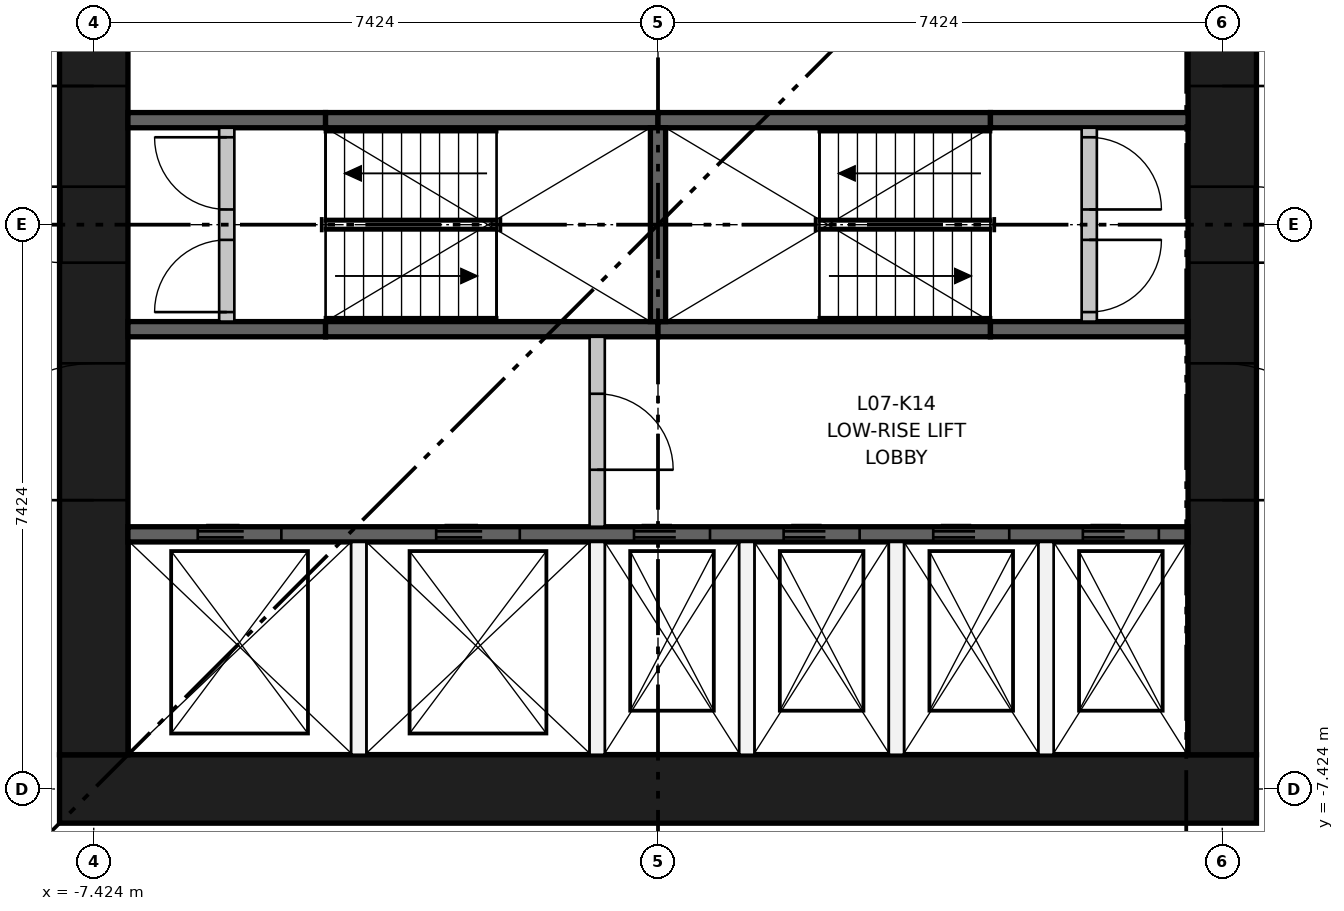
"""IFC4 building model, lengths in metres.
Left out: names, types, materials, properties, quantities, classifications, styles, units other than length and angle.
Written with IfcOpenShell. Run it as: python <this file> out.ifc"""

import sys

from ifc_helpers import new_model, si_unit, direction, frame, frame_2d, origin, place, context, subcontext, project, spatial, rectangle, extrude, element, fill, save


model = new_model("IFC4")
c1 = context("Model", 3, precision=1e-05, world=origin(), true_north=direction((0.0, 1.0)))
c2 = subcontext(c1, "Body", "Model", "MODEL_VIEW")
j1 = project(units=[si_unit("LENGTHUNIT", "METRE"), si_unit("PLANEANGLEUNIT", "RADIAN")], contexts=[c1])
p1 = place(None, origin())
s1 = spatial("IfcSite", under=j1, at=p1, CompositionType="ELEMENT")
p2 = place(p1, origin())
s2 = spatial("IfcBuilding", under=s1, at=p2, CompositionType="ELEMENT")
p3 = place(p2, frame((0.0, 0.0, 29.85)))
s3 = spatial("IfcBuildingStorey", under=s2, at=p3, CompositionType="ELEMENT", Elevation=29.85)
p4 = place(p3, frame((-7.874, -7.424, 0.0), z_axis=(0.0, 0.0, 1.0), x_axis=(1.0, 0.0, 0.0)))
e1 = element("IfcWall", 1, at=p4, inside=s3, PredefinedType="SHEAR", context=c2, shape_type="SweptSolid", body=[
    extrude(rectangle(XDim=15.748, YDim=0.9, at=frame_2d((7.874, 0.0))), origin(), (0.0, 0.0, 1.0), 3.65),
])
p5 = place(p3, frame((-7.424, -6.974, 0.0), z_axis=(0.0, 0.0, 1.0), x_axis=(0.0, 1.0, 0.0)))
e2 = element("IfcWall", 2, at=p5, inside=s3, PredefinedType="SHEAR", context=c2, shape_type="SweptSolid", body=[
    extrude(rectangle(XDim=13.948, YDim=0.9, at=frame_2d((6.974, 0.0))), origin(), (0.0, 0.0, 1.0), 3.65),
])
p6 = place(p5, frame((6.474, 0.0, 0.0)))
e3 = element("IfcOpeningElement", 3, at=p6, cuts=e2, PredefinedType="OPENING", context=c2, shape_type="SweptSolid", body=[
    extrude(rectangle(XDim=1.0, YDim=2.1, at=frame_2d((0.5, 1.05))), frame((0.0, 0.46, 0.0), z_axis=(0.0, -1.0, 0.0), x_axis=(1.0, 0.0, 0.0)), (0.0, 0.0, 1.0), 0.92),
])
p7 = place(p5, frame((3.35, 0.0, 0.0)))
e4 = element("IfcOpeningElement", 4, at=p7, cuts=e2, PredefinedType="OPENING", context=c2, shape_type="SweptSolid", body=[
    extrude(rectangle(XDim=1.8, YDim=2.1, at=frame_2d((0.9, 1.05))), frame((0.0, 0.46, 0.0), z_axis=(0.0, -1.0, 0.0), x_axis=(1.0, 0.0, 0.0)), (0.0, 0.0, 1.0), 0.92),
])
p8 = place(p5, frame((8.799, 0.0, 0.0)))
e5 = element("IfcOpeningElement", 5, at=p8, cuts=e2, PredefinedType="OPENING", context=c2, shape_type="SweptSolid", body=[
    extrude(rectangle(XDim=1.8, YDim=2.1, at=frame_2d((0.9, 1.05))), frame((0.0, 0.46, 0.0), z_axis=(0.0, -1.0, 0.0), x_axis=(1.0, 0.0, 0.0)), (0.0, 0.0, 1.0), 0.92),
])
p9 = place(p5, frame((11.974, 0.0, 0.0)))
e6 = element("IfcOpeningElement", 6, at=p9, cuts=e2, PredefinedType="OPENING", context=c2, shape_type="SweptSolid", body=[
    extrude(rectangle(XDim=1.0, YDim=2.1, at=frame_2d((0.5, 1.05))), frame((0.0, 0.46, 0.0), z_axis=(0.0, -1.0, 0.0), x_axis=(1.0, 0.0, 0.0)), (0.0, 0.0, 1.0), 0.92),
])
p10 = place(p3, frame((7.424, -6.974, 0.0), z_axis=(0.0, 0.0, 1.0), x_axis=(0.0, 1.0, 0.0)))
e7 = element("IfcWall", 7, at=p10, inside=s3, PredefinedType="SHEAR", context=c2, shape_type="SweptSolid", body=[
    extrude(rectangle(XDim=13.948, YDim=0.9, at=frame_2d((6.974, 0.0))), origin(), (0.0, 0.0, 1.0), 3.65),
])
p11 = place(p10, frame((6.474, 0.0, 0.0)))
e8 = element("IfcOpeningElement", 8, at=p11, cuts=e7, PredefinedType="OPENING", context=c2, shape_type="SweptSolid", body=[
    extrude(rectangle(XDim=1.0, YDim=2.1, at=frame_2d((0.5, 1.05))), frame((0.0, 0.46, 0.0), z_axis=(0.0, -1.0, 0.0), x_axis=(1.0, 0.0, 0.0)), (0.0, 0.0, 1.0), 0.92),
])
p12 = place(p10, frame((3.35, 0.0, 0.0)))
e9 = element("IfcOpeningElement", 9, at=p12, cuts=e7, PredefinedType="OPENING", context=c2, shape_type="SweptSolid", body=[
    extrude(rectangle(XDim=1.8, YDim=2.1, at=frame_2d((0.9, 1.05))), frame((0.0, 0.46, 0.0), z_axis=(0.0, -1.0, 0.0), x_axis=(1.0, 0.0, 0.0)), (0.0, 0.0, 1.0), 0.92),
])
p13 = place(p10, frame((8.799, 0.0, 0.0)))
e10 = element("IfcOpeningElement", 10, at=p13, cuts=e7, PredefinedType="OPENING", context=c2, shape_type="SweptSolid", body=[
    extrude(rectangle(XDim=1.8, YDim=2.1, at=frame_2d((0.9, 1.05))), frame((0.0, 0.46, 0.0), z_axis=(0.0, -1.0, 0.0), x_axis=(1.0, 0.0, 0.0)), (0.0, 0.0, 1.0), 0.92),
])
p14 = place(p3, frame((-6.974, -4.074, 0.0), z_axis=(0.0, 0.0, 1.0), x_axis=(1.0, 0.0, 0.0)))
e11 = element("IfcWall", 11, at=p14, inside=s3, PredefinedType="SHEAR", context=c2, shape_type="SweptSolid", body=[
    extrude(rectangle(XDim=13.948, YDim=0.2, at=frame_2d((6.974, 0.0))), origin(), (0.0, 0.0, 1.0), 3.3),
])
p15 = place(p14, frame((0.918, 0.0, 0.0)))
e12 = element("IfcOpeningElement", 12, at=p15, cuts=e11, PredefinedType="OPENING", context=c2, shape_type="SweptSolid", body=[
    extrude(rectangle(XDim=1.1, YDim=2.1, at=frame_2d((0.55, 1.05))), frame((0.0, 0.11, 0.0), z_axis=(0.0, -1.0, 0.0), x_axis=(1.0, 0.0, 0.0)), (0.0, 0.0, 1.0), 0.22),
])
p16 = place(p14, frame((4.055, 0.0, 0.0)))
e13 = element("IfcOpeningElement", 13, at=p16, cuts=e11, PredefinedType="OPENING", context=c2, shape_type="SweptSolid", body=[
    extrude(rectangle(XDim=1.1, YDim=2.1, at=frame_2d((0.55, 1.05))), frame((0.0, 0.11, 0.0), z_axis=(0.0, -1.0, 0.0), x_axis=(1.0, 0.0, 0.0)), (0.0, 0.0, 1.0), 0.22),
])
p17 = place(p14, frame((6.658, 0.0, 0.0)))
e14 = element("IfcOpeningElement", 14, at=p17, cuts=e11, PredefinedType="OPENING", context=c2, shape_type="SweptSolid", body=[
    extrude(rectangle(XDim=1.0, YDim=2.1, at=frame_2d((0.5, 1.05))), frame((0.0, 0.11, 0.0), z_axis=(0.0, -1.0, 0.0), x_axis=(1.0, 0.0, 0.0)), (0.0, 0.0, 1.0), 0.22),
])
p18 = place(p14, frame((8.627, 0.0, 0.0)))
e15 = element("IfcOpeningElement", 15, at=p18, cuts=e11, PredefinedType="OPENING", context=c2, shape_type="SweptSolid", body=[
    extrude(rectangle(XDim=1.0, YDim=2.1, at=frame_2d((0.5, 1.05))), frame((0.0, 0.11, 0.0), z_axis=(0.0, -1.0, 0.0), x_axis=(1.0, 0.0, 0.0)), (0.0, 0.0, 1.0), 0.22),
])
p19 = place(p14, frame((10.595, 0.0, 0.0)))
e16 = element("IfcOpeningElement", 16, at=p19, cuts=e11, PredefinedType="OPENING", context=c2, shape_type="SweptSolid", body=[
    extrude(rectangle(XDim=1.0, YDim=2.1, at=frame_2d((0.5, 1.05))), frame((0.0, 0.11, 0.0), z_axis=(0.0, -1.0, 0.0), x_axis=(1.0, 0.0, 0.0)), (0.0, 0.0, 1.0), 0.22),
])
p20 = place(p14, frame((12.564, 0.0, 0.0)))
e17 = element("IfcOpeningElement", 17, at=p20, cuts=e11, PredefinedType="OPENING", context=c2, shape_type="SweptSolid", body=[
    extrude(rectangle(XDim=1.0, YDim=2.1, at=frame_2d((0.5, 1.05))), frame((0.0, 0.11, 0.0), z_axis=(0.0, -1.0, 0.0), x_axis=(1.0, 0.0, 0.0)), (0.0, 0.0, 1.0), 0.22),
])
p21 = place(p3, frame((-6.974, -1.375, 0.0), z_axis=(0.0, 0.0, 1.0), x_axis=(1.0, 0.0, 0.0)))
e18 = element("IfcWall", 18, at=p21, inside=s3, PredefinedType="SHEAR", context=c2, shape_type="SweptSolid", body=[
    extrude(rectangle(XDim=2.6, YDim=0.2, at=frame_2d((1.3, 0.0))), origin(), (0.0, 0.0, 1.0), 3.3),
])
for number, where, z_axis, x_axis in (
    (19, (-4.374, -1.375, 0.0), (0.0, 0.0, 1.0), (1.0, 0.0, 0.0)),
    (20, (0.0, -1.375, 0.0), (0.0, 0.0, 1.0), (1.0, 0.0, 0.0)),
):
    element("IfcWall", number, at=place(p3, frame(where, z_axis=z_axis, x_axis=x_axis)), inside=s3, PredefinedType="SHEAR", context=c2, shape_type="SweptSolid", body=[
        extrude(rectangle(XDim=4.374, YDim=0.2, at=frame_2d((2.187, 0.0))), origin(), (0.0, 0.0, 1.0), 3.3),
    ])
for number, where, z_axis, x_axis in (
    (21, (4.374, -1.375, 0.0), (0.0, 0.0, 1.0), (1.0, 0.0, 0.0)),
    (22, (-6.974, 1.375, 0.0), (0.0, 0.0, 1.0), (1.0, 0.0, 0.0)),
):
    element("IfcWall", number, at=place(p3, frame(where, z_axis=z_axis, x_axis=x_axis)), inside=s3, PredefinedType="SHEAR", context=c2, shape_type="SweptSolid", body=[
        extrude(rectangle(XDim=2.6, YDim=0.2, at=frame_2d((1.3, 0.0))), origin(), (0.0, 0.0, 1.0), 3.3),
    ])
for number, where, z_axis, x_axis in (
    (23, (-4.374, 1.375, 0.0), (0.0, 0.0, 1.0), (1.0, 0.0, 0.0)),
    (24, (0.0, 1.375, 0.0), (0.0, 0.0, 1.0), (1.0, 0.0, 0.0)),
):
    element("IfcWall", number, at=place(p3, frame(where, z_axis=z_axis, x_axis=x_axis)), inside=s3, PredefinedType="SHEAR", context=c2, shape_type="SweptSolid", body=[
        extrude(rectangle(XDim=4.374, YDim=0.2, at=frame_2d((2.187, 0.0))), origin(), (0.0, 0.0, 1.0), 3.3),
    ])
p22 = place(p3, frame((4.374, 1.375, 0.0), z_axis=(0.0, 0.0, 1.0), x_axis=(1.0, 0.0, 0.0)))
e25 = element("IfcWall", 25, at=p22, inside=s3, PredefinedType="SHEAR", context=c2, shape_type="SweptSolid", body=[
    extrude(rectangle(XDim=2.6, YDim=0.2, at=frame_2d((1.3, 0.0))), origin(), (0.0, 0.0, 1.0), 3.3),
])
p23 = place(p3, frame((0.0, -1.275, 0.0), z_axis=(0.0, 0.0, 1.0), x_axis=(0.0, 1.0, 0.0)))
e26 = element("IfcWall", 26, at=p23, inside=s3, PredefinedType="SHEAR", context=c2, shape_type="SweptSolid", body=[
    extrude(rectangle(XDim=2.55, YDim=0.2, at=frame_2d((1.275, 0.0))), origin(), (0.0, 0.0, 1.0), 3.3),
])
for number, where, z_axis, x_axis in (
    (27, (-3.937, -6.974, 0.0), (0.0, 0.0, 1.0), (0.0, 1.0, 0.0)),
    (28, (-0.8, -6.974, 0.0), (0.0, 0.0, 1.0), (0.0, 1.0, 0.0)),
):
    element("IfcWall", number, at=place(p3, frame(where, z_axis=z_axis, x_axis=x_axis)), inside=s3, PredefinedType="PARTITIONING", context=c2, shape_type="SweptSolid", body=[
        extrude(rectangle(XDim=2.8, YDim=0.2, at=frame_2d((1.4, 0.0))), origin(), (0.0, 0.0, 1.0), 3.3),
    ])
p24 = place(p3, frame((-0.8, -3.974, 0.0), z_axis=(0.0, 0.0, 1.0), x_axis=(0.0, 1.0, 0.0)))
e29 = element("IfcWall", 29, at=p24, inside=s3, PredefinedType="PARTITIONING", context=c2, shape_type="SweptSolid", body=[
    extrude(rectangle(XDim=2.499, YDim=0.2, at=frame_2d((1.25, 0.0))), origin(), (0.0, 0.0, 1.0), 3.3),
])
p25 = place(p24, frame((0.75, 0.0, 0.0)))
e30 = element("IfcOpeningElement", 30, at=p25, cuts=e29, PredefinedType="OPENING", context=c2, shape_type="SweptSolid", body=[
    extrude(rectangle(XDim=1.0, YDim=2.1, at=frame_2d((0.5, 1.05))), frame((0.0, 0.11, 0.0), z_axis=(0.0, -1.0, 0.0), x_axis=(1.0, 0.0, 0.0)), (0.0, 0.0, 1.0), 0.22),
])
for number, where, z_axis, x_axis in (
    (31, (1.168, -6.974, 0.0), (0.0, 0.0, 1.0), (0.0, 1.0, 0.0)),
    (32, (3.137, -6.974, 0.0), (0.0, 0.0, 1.0), (0.0, 1.0, 0.0)),
    (33, (5.105, -6.974, 0.0), (0.0, 0.0, 1.0), (0.0, 1.0, 0.0)),
):
    element("IfcWall", number, at=place(p3, frame(where, z_axis=z_axis, x_axis=x_axis)), inside=s3, PredefinedType="PARTITIONING", context=c2, shape_type="SweptSolid", body=[
        extrude(rectangle(XDim=2.8, YDim=0.2, at=frame_2d((1.4, 0.0))), origin(), (0.0, 0.0, 1.0), 3.3),
    ])
p26 = place(p3, frame((-5.674, -1.275, 0.0), z_axis=(0.0, 0.0, 1.0), x_axis=(0.0, 1.0, 0.0)))
e34 = element("IfcWall", 34, at=p26, inside=s3, PredefinedType="PARTITIONING", context=c2, shape_type="SweptSolid", body=[
    extrude(rectangle(XDim=2.55, YDim=0.2, at=frame_2d((1.275, 0.0))), origin(), (0.0, 0.0, 1.0), 3.3),
])
p27 = place(p26, frame((0.125, 0.0, 0.0)))
e35 = element("IfcOpeningElement", 35, at=p27, cuts=e34, PredefinedType="OPENING", context=c2, shape_type="SweptSolid", body=[
    extrude(rectangle(XDim=0.95, YDim=2.1, at=frame_2d((0.475, 1.05))), frame((0.0, 0.11, 0.0), z_axis=(0.0, -1.0, 0.0), x_axis=(1.0, 0.0, 0.0)), (0.0, 0.0, 1.0), 0.22),
])
p28 = place(p26, frame((1.475, 0.0, 0.0)))
e36 = element("IfcOpeningElement", 36, at=p28, cuts=e34, PredefinedType="OPENING", context=c2, shape_type="SweptSolid", body=[
    extrude(rectangle(XDim=0.95, YDim=2.1, at=frame_2d((0.475, 1.05))), frame((0.0, 0.11, 0.0), z_axis=(0.0, -1.0, 0.0), x_axis=(1.0, 0.0, 0.0)), (0.0, 0.0, 1.0), 0.22),
])
p29 = place(p3, frame((5.674, -1.275, 0.0), z_axis=(0.0, 0.0, 1.0), x_axis=(0.0, 1.0, 0.0)))
e37 = element("IfcWall", 37, at=p29, inside=s3, PredefinedType="PARTITIONING", context=c2, shape_type="SweptSolid", body=[
    extrude(rectangle(XDim=2.55, YDim=0.2, at=frame_2d((1.275, 0.0))), origin(), (0.0, 0.0, 1.0), 3.3),
])
p30 = place(p29, frame((0.125, 0.0, 0.0)))
e38 = element("IfcOpeningElement", 38, at=p30, cuts=e37, PredefinedType="OPENING", context=c2, shape_type="SweptSolid", body=[
    extrude(rectangle(XDim=0.95, YDim=2.1, at=frame_2d((0.475, 1.05))), frame((0.0, 0.11, 0.0), z_axis=(0.0, -1.0, 0.0), x_axis=(1.0, 0.0, 0.0)), (0.0, 0.0, 1.0), 0.22),
])
p31 = place(p29, frame((1.475, 0.0, 0.0)))
e39 = element("IfcOpeningElement", 39, at=p31, cuts=e37, PredefinedType="OPENING", context=c2, shape_type="SweptSolid", body=[
    extrude(rectangle(XDim=0.95, YDim=2.1, at=frame_2d((0.475, 1.05))), frame((0.0, 0.11, 0.0), z_axis=(0.0, -1.0, 0.0), x_axis=(1.0, 0.0, 0.0)), (0.0, 0.0, 1.0), 0.22),
])
p32 = place(p15, origin())
e40 = element("IfcDoor", 40, at=p32, inside=s3, OperationType="DOUBLE_DOOR_SLIDING", PredefinedType="DOOR", context=c2, shape_type="SweptSolid", body=[
    extrude(rectangle(XDim=1.1, YDim=2.1, at=frame_2d((0.55, 1.05))), frame((0.0, 0.025, 0.0), z_axis=(0.0, -1.0, 0.0), x_axis=(1.0, 0.0, 0.0)), (0.0, 0.0, 1.0), 0.05),
])
fill(e12, e40)
p33 = place(p16, origin())
e41 = element("IfcDoor", 41, at=p33, inside=s3, OperationType="DOUBLE_DOOR_SLIDING", PredefinedType="DOOR", context=c2, shape_type="SweptSolid", body=[
    extrude(rectangle(XDim=1.1, YDim=2.1, at=frame_2d((0.55, 1.05))), frame((0.0, 0.025, 0.0), z_axis=(0.0, -1.0, 0.0), x_axis=(1.0, 0.0, 0.0)), (0.0, 0.0, 1.0), 0.05),
])
fill(e13, e41)
p34 = place(p17, origin())
e42 = element("IfcDoor", 42, at=p34, inside=s3, OperationType="DOUBLE_DOOR_SLIDING", PredefinedType="DOOR", context=c2, shape_type="SweptSolid", body=[
    extrude(rectangle(XDim=1.0, YDim=2.1, at=frame_2d((0.5, 1.05))), frame((0.0, 0.025, 0.0), z_axis=(0.0, -1.0, 0.0), x_axis=(1.0, 0.0, 0.0)), (0.0, 0.0, 1.0), 0.05),
])
fill(e14, e42)
p35 = place(p18, origin())
e43 = element("IfcDoor", 43, at=p35, inside=s3, OperationType="DOUBLE_DOOR_SLIDING", PredefinedType="DOOR", context=c2, shape_type="SweptSolid", body=[
    extrude(rectangle(XDim=1.0, YDim=2.1, at=frame_2d((0.5, 1.05))), frame((0.0, 0.025, 0.0), z_axis=(0.0, -1.0, 0.0), x_axis=(1.0, 0.0, 0.0)), (0.0, 0.0, 1.0), 0.05),
])
fill(e15, e43)
p36 = place(p19, origin())
e44 = element("IfcDoor", 44, at=p36, inside=s3, OperationType="DOUBLE_DOOR_SLIDING", PredefinedType="DOOR", context=c2, shape_type="SweptSolid", body=[
    extrude(rectangle(XDim=1.0, YDim=2.1, at=frame_2d((0.5, 1.05))), frame((0.0, 0.025, 0.0), z_axis=(0.0, -1.0, 0.0), x_axis=(1.0, 0.0, 0.0)), (0.0, 0.0, 1.0), 0.05),
])
fill(e16, e44)
p37 = place(p20, origin())
e45 = element("IfcDoor", 45, at=p37, inside=s3, OperationType="DOUBLE_DOOR_SLIDING", PredefinedType="DOOR", context=c2, shape_type="SweptSolid", body=[
    extrude(rectangle(XDim=1.0, YDim=2.1, at=frame_2d((0.5, 1.05))), frame((0.0, 0.025, 0.0), z_axis=(0.0, -1.0, 0.0), x_axis=(1.0, 0.0, 0.0)), (0.0, 0.0, 1.0), 0.05),
])
fill(e17, e45)
p38 = place(p27, origin())
e46 = element("IfcDoor", 46, at=p38, inside=s3, OperationType="SINGLE_SWING_LEFT", PredefinedType="DOOR", context=c2, shape_type="SweptSolid", body=[
    extrude(rectangle(XDim=0.95, YDim=2.1, at=frame_2d((0.475, 1.05))), frame((0.0, 0.025, 0.0), z_axis=(0.0, -1.0, 0.0), x_axis=(1.0, 0.0, 0.0)), (0.0, 0.0, 1.0), 0.05),
])
fill(e35, e46)
p39 = place(p28, origin())
e47 = element("IfcDoor", 47, at=p39, inside=s3, OperationType="SINGLE_SWING_RIGHT", PredefinedType="DOOR", context=c2, shape_type="SweptSolid", body=[
    extrude(rectangle(XDim=0.95, YDim=2.1, at=frame_2d((0.475, 1.05))), frame((0.0, 0.025, 0.0), z_axis=(0.0, -1.0, 0.0), x_axis=(1.0, 0.0, 0.0)), (0.0, 0.0, 1.0), 0.05),
])
fill(e36, e47)
p40 = place(p30, frame((0.95, 0.0, 0.0), z_axis=(0.0, 0.0, 1.0), x_axis=(-1.0, 0.0, 0.0)))
e48 = element("IfcDoor", 48, at=p40, inside=s3, OperationType="SINGLE_SWING_RIGHT", PredefinedType="DOOR", context=c2, shape_type="SweptSolid", body=[
    extrude(rectangle(XDim=0.95, YDim=2.1, at=frame_2d((0.475, 1.05))), frame((0.0, 0.025, 0.0), z_axis=(0.0, -1.0, 0.0), x_axis=(1.0, 0.0, 0.0)), (0.0, 0.0, 1.0), 0.05),
])
fill(e38, e48)
p41 = place(p31, frame((0.95, 0.0, 0.0), z_axis=(0.0, 0.0, 1.0), x_axis=(-1.0, 0.0, 0.0)))
e49 = element("IfcDoor", 49, at=p41, inside=s3, OperationType="SINGLE_SWING_LEFT", PredefinedType="DOOR", context=c2, shape_type="SweptSolid", body=[
    extrude(rectangle(XDim=0.95, YDim=2.1, at=frame_2d((0.475, 1.05))), frame((0.0, 0.025, 0.0), z_axis=(0.0, -1.0, 0.0), x_axis=(1.0, 0.0, 0.0)), (0.0, 0.0, 1.0), 0.05),
])
fill(e39, e49)
p42 = place(p25, frame((1.0, 0.0, 0.0), z_axis=(0.0, 0.0, 1.0), x_axis=(-1.0, 0.0, 0.0)))
e50 = element("IfcDoor", 50, at=p42, inside=s3, OperationType="SINGLE_SWING_LEFT", PredefinedType="DOOR", context=c2, shape_type="SweptSolid", body=[
    extrude(rectangle(XDim=1.0, YDim=2.1, at=frame_2d((0.5, 1.05))), frame((0.0, 0.025, 0.0), z_axis=(0.0, -1.0, 0.0), x_axis=(1.0, 0.0, 0.0)), (0.0, 0.0, 1.0), 0.05),
])
fill(e30, e50)
p43 = place(p6, origin())
e51 = element("IfcDoor", 51, at=p43, inside=s3, OperationType="SINGLE_SWING_RIGHT", PredefinedType="DOOR", context=c2, shape_type="SweptSolid", body=[
    extrude(rectangle(XDim=1.0, YDim=2.1, at=frame_2d((0.5, 1.05))), frame((0.0, 0.45, 0.0), z_axis=(0.0, -1.0, 0.0), x_axis=(1.0, 0.0, 0.0)), (0.0, 0.0, 1.0), 0.05),
])
fill(e3, e51)
p44 = place(p7, origin())
e52 = element("IfcDoor", 52, at=p44, inside=s3, OperationType="DOUBLE_DOOR_SINGLE_SWING", PredefinedType="DOOR", context=c2, shape_type="SweptSolid", body=[
    extrude(rectangle(XDim=1.8, YDim=2.1, at=frame_2d((0.9, 1.05))), frame((0.0, 0.025, 0.0), z_axis=(0.0, -1.0, 0.0), x_axis=(1.0, 0.0, 0.0)), (0.0, 0.0, 1.0), 0.05),
])
fill(e4, e52)
p45 = place(p8, origin())
e53 = element("IfcDoor", 53, at=p45, inside=s3, OperationType="DOUBLE_DOOR_SINGLE_SWING", PredefinedType="DOOR", context=c2, shape_type="SweptSolid", body=[
    extrude(rectangle(XDim=1.8, YDim=2.1, at=frame_2d((0.9, 1.05))), frame((0.0, 0.025, 0.0), z_axis=(0.0, -1.0, 0.0), x_axis=(1.0, 0.0, 0.0)), (0.0, 0.0, 1.0), 0.05),
])
fill(e5, e53)
p46 = place(p11, frame((1.0, 0.0, 0.0), z_axis=(0.0, 0.0, 1.0), x_axis=(-1.0, 0.0, 0.0)))
e54 = element("IfcDoor", 54, at=p46, inside=s3, OperationType="SINGLE_SWING_LEFT", PredefinedType="DOOR", context=c2, shape_type="SweptSolid", body=[
    extrude(rectangle(XDim=1.0, YDim=2.1, at=frame_2d((0.5, 1.05))), frame((0.0, 0.45, 0.0), z_axis=(0.0, -1.0, 0.0), x_axis=(1.0, 0.0, 0.0)), (0.0, 0.0, 1.0), 0.05),
])
fill(e8, e54)
p47 = place(p12, frame((1.8, 0.0, 0.0), z_axis=(0.0, 0.0, 1.0), x_axis=(-1.0, 0.0, 0.0)))
e55 = element("IfcDoor", 55, at=p47, inside=s3, OperationType="DOUBLE_DOOR_SINGLE_SWING", PredefinedType="DOOR", context=c2, shape_type="SweptSolid", body=[
    extrude(rectangle(XDim=1.8, YDim=2.1, at=frame_2d((0.9, 1.05))), frame((0.0, 0.025, 0.0), z_axis=(0.0, -1.0, 0.0), x_axis=(1.0, 0.0, 0.0)), (0.0, 0.0, 1.0), 0.05),
])
fill(e9, e55)
p48 = place(p13, frame((1.8, 0.0, 0.0), z_axis=(0.0, 0.0, 1.0), x_axis=(-1.0, 0.0, 0.0)))
e56 = element("IfcDoor", 56, at=p48, inside=s3, OperationType="DOUBLE_DOOR_SINGLE_SWING", PredefinedType="DOOR", context=c2, shape_type="SweptSolid", body=[
    extrude(rectangle(XDim=1.8, YDim=2.1, at=frame_2d((0.9, 1.05))), frame((0.0, 0.025, 0.0), z_axis=(0.0, -1.0, 0.0), x_axis=(1.0, 0.0, 0.0)), (0.0, 0.0, 1.0), 0.05),
])
fill(e10, e56)
save(model, sys.argv[1])
